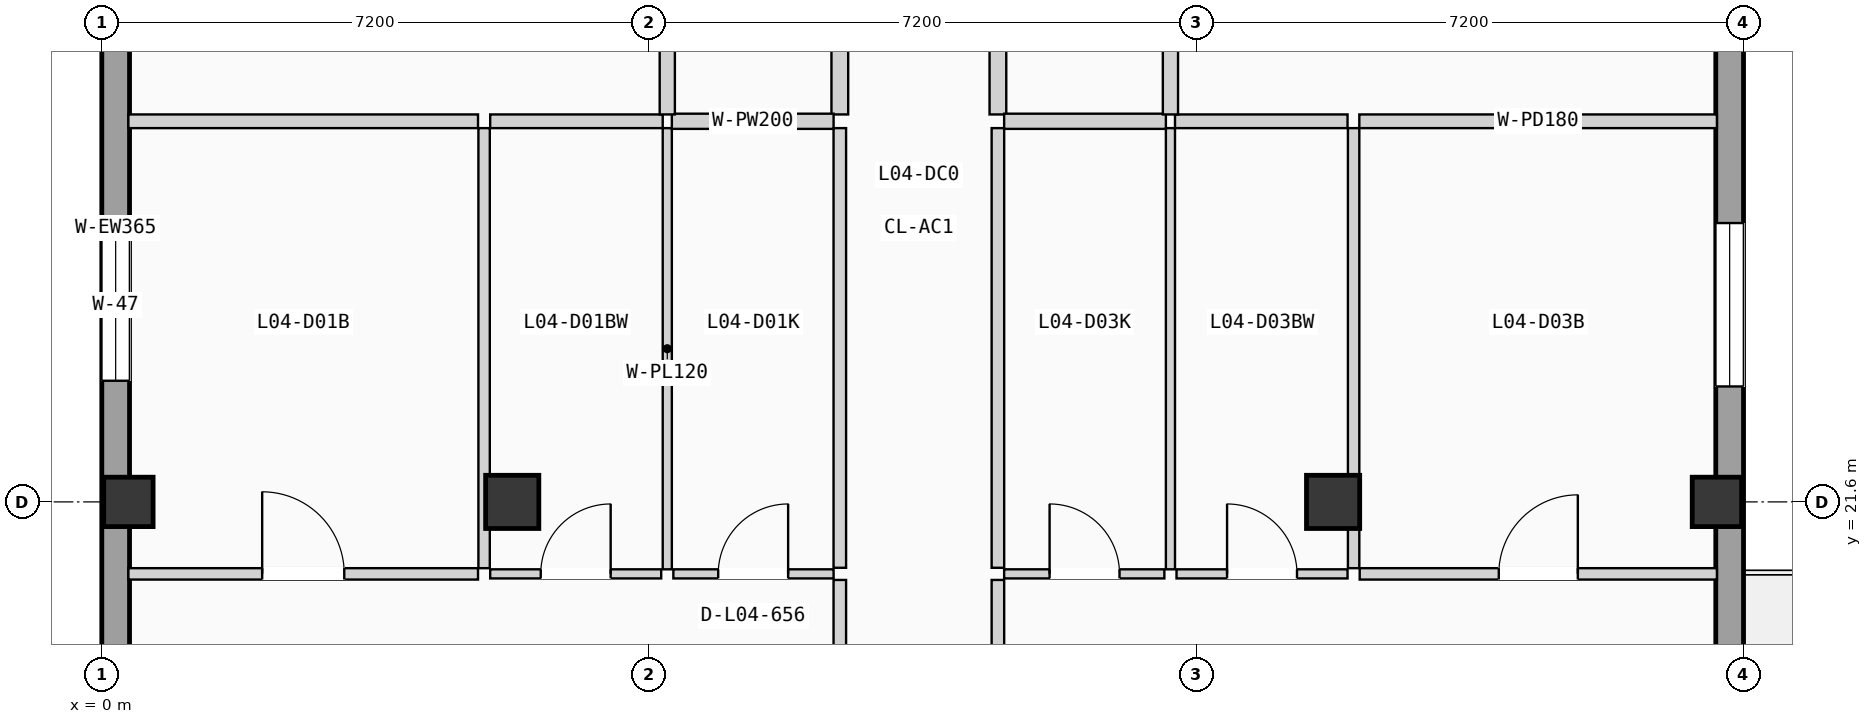
"""IFC4 building model, lengths in metres.
Left out: names, types, materials, properties, quantities, classifications, styles, units other than length and angle.
Written with IfcOpenShell. Run it as: python <this file> out.ifc"""

import sys

from ifc_helpers import new_model, si_unit, direction, frame, frame_2d, origin, origin_2d, place, context, subcontext, project, spatial, rectangle, extrude, element, fill, save


model = new_model("IFC4")
c1 = context("Model", 3, precision=1e-05, world=origin(), true_north=direction((0.0, 1.0)))
c2 = subcontext(c1, "Body", "Model", "MODEL_VIEW")
j1 = project(units=[si_unit("LENGTHUNIT", "METRE"), si_unit("PLANEANGLEUNIT", "RADIAN")], contexts=[c1])
p1 = place(None, origin())
s1 = spatial("IfcSite", under=j1, at=p1, CompositionType="ELEMENT")
p2 = place(p1, origin())
s2 = spatial("IfcBuilding", under=s1, at=p2, CompositionType="ELEMENT")
p3 = place(p2, frame((0.0, 0.0, 15.225)))
s3 = spatial("IfcBuildingStorey", under=s2, at=p3, CompositionType="ELEMENT", Elevation=15.225)
p4 = place(p3, frame((0.35, 21.6, 0.0), z_axis=(0.0, 0.0, 1.0), x_axis=(1.0, 0.0, 0.0)))
e1 = element("IfcColumn", 1, at=p4, inside=s3, PredefinedType="COLUMN", context=c2, shape_type="SweptSolid", body=[
    extrude(rectangle(XDim=0.65, YDim=0.65, at=origin_2d()), origin(), (0.0, 0.0, 1.0), 3.15),
])
for number, where, z_axis, x_axis in (
    (2, (5.4, 21.6, 0.0), (0.0, 0.0, 1.0), (1.0, 0.0, 0.0)),
    (3, (16.2, 21.6, 0.0), (0.0, 0.0, 1.0), (1.0, 0.0, 0.0)),
):
    element("IfcColumn", number, at=place(p3, frame(where, z_axis=z_axis, x_axis=x_axis)), inside=s3, PredefinedType="COLUMN", context=c2, shape_type="SweptSolid", body=[
        extrude(rectangle(XDim=0.7, YDim=0.7, at=origin_2d()), origin(), (0.0, 0.0, 1.0), 3.15),
    ])
p5 = place(p3, frame((21.25, 21.6, 0.0), z_axis=(0.0, 0.0, 1.0), x_axis=(1.0, 0.0, 0.0)))
e4 = element("IfcColumn", 4, at=p5, inside=s3, PredefinedType="COLUMN", context=c2, shape_type="SweptSolid", body=[
    extrude(rectangle(XDim=0.65, YDim=0.65, at=origin_2d()), origin(), (0.0, 0.0, 1.0), 3.15),
])
p6 = place(p3, frame((0.183, 0.365, 0.0), z_axis=(0.0, 0.0, 1.0), x_axis=(0.0, 1.0, 0.0)))
e5 = element("IfcWall", 5, at=p6, inside=s3, PredefinedType="SOLIDWALL", context=c2, shape_type="SweptSolid", body=[
    extrude(rectangle(XDim=49.67, YDim=0.365, at=frame_2d((24.835, 0.0))), origin(), (0.0, 0.0, 1.0), 2.89),
])
p7 = place(p6, frame((16.782, 0.0, 0.85)))
e6 = element("IfcOpeningElement", 6, at=p7, cuts=e5, PredefinedType="OPENING", context=c2, shape_type="SweptSolid", body=[
    extrude(rectangle(XDim=0.95, YDim=1.2, at=frame_2d((0.475, 0.6))), frame((0.0, 0.192, 0.0), z_axis=(0.0, -1.0, 0.0), x_axis=(1.0, 0.0, 0.0)), (0.0, 0.0, 1.0), 0.385),
])
p8 = place(p6, frame((9.127, 0.0, 0.9)))
e7 = element("IfcOpeningElement", 7, at=p8, cuts=e5, PredefinedType="OPENING", context=c2, shape_type="SweptSolid", body=[
    extrude(rectangle(XDim=2.0, YDim=1.2, at=frame_2d((1.0, 0.6))), frame((0.0, 0.192, 0.0), z_axis=(0.0, -1.0, 0.0), x_axis=(1.0, 0.0, 0.0)), (0.0, 0.0, 1.0), 0.385),
])
p9 = place(p6, frame((22.829, 0.0, 0.855)))
e8 = element("IfcOpeningElement", 8, at=p9, cuts=e5, PredefinedType="OPENING", context=c2, shape_type="SweptSolid", body=[
    extrude(rectangle(XDim=2.0, YDim=1.35, at=frame_2d((1.0, 0.675))), frame((0.0, 0.192, 0.0), z_axis=(0.0, -1.0, 0.0), x_axis=(1.0, 0.0, 0.0)), (0.0, 0.0, 1.0), 0.385),
])
p10 = place(p6, frame((32.385, 0.0, 0.705)))
e9 = element("IfcOpeningElement", 9, at=p10, cuts=e5, PredefinedType="OPENING", context=c2, shape_type="SweptSolid", body=[
    extrude(rectangle(XDim=2.0, YDim=1.5, at=frame_2d((1.0, 0.75))), frame((0.0, 0.192, 0.0), z_axis=(0.0, -1.0, 0.0), x_axis=(1.0, 0.0, 0.0)), (0.0, 0.0, 1.0), 0.385),
])
p11 = place(p6, frame((28.975, 0.0, 0.555)))
e10 = element("IfcOpeningElement", 10, at=p11, cuts=e5, PredefinedType="OPENING", context=c2, shape_type="SweptSolid", body=[
    extrude(rectangle(XDim=2.0, YDim=1.65, at=frame_2d((1.0, 0.825))), frame((0.0, 0.192, 0.0), z_axis=(0.0, -1.0, 0.0), x_axis=(1.0, 0.0, 0.0)), (0.0, 0.0, 1.0), 0.385),
])
p12 = place(p6, frame((39.504, 0.0, 0.85)))
e11 = element("IfcOpeningElement", 11, at=p12, cuts=e5, PredefinedType="OPENING", context=c2, shape_type="SweptSolid", body=[
    extrude(rectangle(XDim=0.95, YDim=1.2, at=frame_2d((0.475, 0.6))), frame((0.0, 0.192, 0.0), z_axis=(0.0, -1.0, 0.0), x_axis=(1.0, 0.0, 0.0)), (0.0, 0.0, 1.0), 0.385),
])
p13 = place(p3, frame((21.417, 0.365, 0.0), z_axis=(0.0, 0.0, 1.0), x_axis=(0.0, 1.0, 0.0)))
e12 = element("IfcWall", 12, at=p13, inside=s3, PredefinedType="SOLIDWALL", context=c2, shape_type="SweptSolid", body=[
    extrude(rectangle(XDim=49.67, YDim=0.365, at=frame_2d((24.835, 0.0))), origin(), (0.0, 0.0, 1.0), 2.89),
])
p14 = place(p13, frame((16.335, 0.0, 0.0)))
e13 = element("IfcOpeningElement", 13, at=p14, cuts=e12, PredefinedType="OPENING", context=c2, shape_type="SweptSolid", body=[
    extrude(rectangle(XDim=0.95, YDim=2.15, at=frame_2d((0.475, 1.075))), frame((0.0, 0.192, 0.0), z_axis=(0.0, -1.0, 0.0), x_axis=(1.0, 0.0, 0.0)), (0.0, 0.0, 1.0), 0.385),
])
p15 = place(p13, frame((9.053, 0.0, 0.9)))
e14 = element("IfcOpeningElement", 14, at=p15, cuts=e12, PredefinedType="OPENING", context=c2, shape_type="SweptSolid", body=[
    extrude(rectangle(XDim=2.15, YDim=1.2, at=frame_2d((1.075, 0.6))), frame((0.0, 0.192, 0.0), z_axis=(0.0, -1.0, 0.0), x_axis=(1.0, 0.0, 0.0)), (0.0, 0.0, 1.0), 0.385),
])
p16 = place(p13, frame((22.754, 0.0, 0.855)))
e15 = element("IfcOpeningElement", 15, at=p16, cuts=e12, PredefinedType="OPENING", context=c2, shape_type="SweptSolid", body=[
    extrude(rectangle(XDim=2.15, YDim=1.35, at=frame_2d((1.075, 0.675))), frame((0.0, 0.192, 0.0), z_axis=(0.0, -1.0, 0.0), x_axis=(1.0, 0.0, 0.0)), (0.0, 0.0, 1.0), 0.385),
])
p17 = place(p13, frame((32.43, 0.0, 0.0)))
e16 = element("IfcOpeningElement", 16, at=p17, cuts=e12, PredefinedType="OPENING", context=c2, shape_type="SweptSolid", body=[
    extrude(rectangle(XDim=1.08, YDim=2.18, at=frame_2d((0.54, 1.09))), frame((0.0, 0.192, 0.0), z_axis=(0.0, -1.0, 0.0), x_axis=(1.0, 0.0, 0.0)), (0.0, 0.0, 1.0), 0.385),
])
p18 = place(p13, frame((29.5, 0.0, 0.85)))
e17 = element("IfcOpeningElement", 17, at=p18, cuts=e12, PredefinedType="OPENING", context=c2, shape_type="SweptSolid", body=[
    extrude(rectangle(XDim=0.95, YDim=1.2, at=frame_2d((0.475, 0.6))), frame((0.0, 0.192, 0.0), z_axis=(0.0, -1.0, 0.0), x_axis=(1.0, 0.0, 0.0)), (0.0, 0.0, 1.0), 0.385),
])
p19 = place(p13, frame((38.904, 0.0, 0.555)))
e18 = element("IfcOpeningElement", 18, at=p19, cuts=e12, PredefinedType="OPENING", context=c2, shape_type="SweptSolid", body=[
    extrude(rectangle(XDim=2.15, YDim=1.65, at=frame_2d((1.075, 0.825))), frame((0.0, 0.192, 0.0), z_axis=(0.0, -1.0, 0.0), x_axis=(1.0, 0.0, 0.0)), (0.0, 0.0, 1.0), 0.385),
])
p20 = place(p3, frame((9.71, 13.545, 0.0), z_axis=(0.0, 0.0, 1.0), x_axis=(0.0, 1.0, 0.0)))
e19 = element("IfcWall", 19, at=p20, inside=s3, PredefinedType="PARTITIONING", context=c2, shape_type="SweptSolid", body=[
    extrude(rectangle(XDim=7.028, YDim=0.165, at=frame_2d((3.514, 0.0))), origin(), (0.0, 0.0, 1.0), 2.87),
])
p21 = place(p20, frame((3.009, 0.0, 0.0)))
e20 = element("IfcOpeningElement", 20, at=p21, cuts=e19, PredefinedType="OPENING", context=c2, shape_type="SweptSolid", body=[
    extrude(rectangle(XDim=1.01, YDim=2.11, at=frame_2d((0.505, 1.055))), frame((0.0, 0.093, 0.0), z_axis=(0.0, -1.0, 0.0), x_axis=(1.0, 0.0, 0.0)), (0.0, 0.0, 1.0), 0.185),
])
p22 = place(p3, frame((9.71, 20.733, 0.0), z_axis=(0.0, 0.0, 1.0), x_axis=(0.0, 1.0, 0.0)))
e21 = element("IfcWall", 21, at=p22, inside=s3, PredefinedType="PARTITIONING", context=c2, shape_type="SweptSolid", body=[
    extrude(rectangle(XDim=5.785, YDim=0.165, at=frame_2d((2.893, 0.0))), origin(), (0.0, 0.0, 1.0), 2.87),
])
p23 = place(p3, frame((9.71, 26.698, 0.0), z_axis=(0.0, 0.0, 1.0), x_axis=(0.0, 1.0, 0.0)))
e22 = element("IfcWall", 22, at=p23, inside=s3, PredefinedType="PLUMBINGWALL", context=c2, shape_type="SweptSolid", body=[
    extrude(rectangle(XDim=4.912, YDim=0.22, at=frame_2d((2.456, 0.0))), origin(), (0.0, 0.0, 1.0), 2.87),
])
p24 = place(p3, frame((11.79, 13.545, 0.0), z_axis=(0.0, 0.0, 1.0), x_axis=(0.0, 1.0, 0.0)))
e23 = element("IfcWall", 23, at=p24, inside=s3, PredefinedType="PARTITIONING", context=c2, shape_type="SweptSolid", body=[
    extrude(rectangle(XDim=7.028, YDim=0.165, at=frame_2d((3.514, 0.0))), origin(), (0.0, 0.0, 1.0), 2.87),
])
p25 = place(p24, frame((3.009, 0.0, 0.0)))
e24 = element("IfcOpeningElement", 24, at=p25, cuts=e23, PredefinedType="OPENING", context=c2, shape_type="SweptSolid", body=[
    extrude(rectangle(XDim=1.01, YDim=2.11, at=frame_2d((0.505, 1.055))), frame((0.0, 0.093, 0.0), z_axis=(0.0, -1.0, 0.0), x_axis=(1.0, 0.0, 0.0)), (0.0, 0.0, 1.0), 0.185),
])
p26 = place(p3, frame((11.79, 20.733, 0.0), z_axis=(0.0, 0.0, 1.0), x_axis=(0.0, 1.0, 0.0)))
e25 = element("IfcWall", 25, at=p26, inside=s3, PredefinedType="PARTITIONING", context=c2, shape_type="SweptSolid", body=[
    extrude(rectangle(XDim=5.785, YDim=0.165, at=frame_2d((2.893, 0.0))), origin(), (0.0, 0.0, 1.0), 2.87),
])
p27 = place(p3, frame((11.79, 26.698, 0.0), z_axis=(0.0, 0.0, 1.0), x_axis=(0.0, 1.0, 0.0)))
e26 = element("IfcWall", 26, at=p27, inside=s3, PredefinedType="PLUMBINGWALL", context=c2, shape_type="SweptSolid", body=[
    extrude(rectangle(XDim=4.912, YDim=0.22, at=frame_2d((2.456, 0.0))), origin(), (0.0, 0.0, 1.0), 2.87),
])
p28 = place(p3, frame((7.52, 20.653, 0.0), z_axis=(0.0, 0.0, 1.0), x_axis=(1.0, 0.0, 0.0)))
e27 = element("IfcWall", 27, at=p28, inside=s3, PredefinedType="PARTITIONING", context=c2, shape_type="SweptSolid", body=[
    extrude(rectangle(XDim=2.108, YDim=0.12, at=frame_2d((1.054, 0.0))), origin(), (0.0, 0.0, 1.0), 2.87),
])
p29 = place(p28, frame((0.59, 0.0, 0.0)))
e28 = element("IfcOpeningElement", 28, at=p29, cuts=e27, PredefinedType="OPENING", context=c2, shape_type="SweptSolid", body=[
    extrude(rectangle(XDim=0.92, YDim=2.02, at=frame_2d((0.46, 1.01))), frame((0.0, 0.07, 0.0), z_axis=(0.0, -1.0, 0.0), x_axis=(1.0, 0.0, 0.0)), (0.0, 0.0, 1.0), 0.14),
])
p30 = place(p3, frame((0.35, 20.653, 0.0), z_axis=(0.0, 0.0, 1.0), x_axis=(1.0, 0.0, 0.0)))
e29 = element("IfcWall", 29, at=p30, inside=s3, PredefinedType="PARTITIONING", context=c2, shape_type="SweptSolid", body=[
    extrude(rectangle(XDim=4.6, YDim=0.15, at=frame_2d((2.3, 0.0))), origin(), (0.0, 0.0, 1.0), 2.87),
])
p31 = place(p30, frame((1.76, 0.0, 0.0)))
e30 = element("IfcOpeningElement", 30, at=p31, cuts=e29, PredefinedType="OPENING", context=c2, shape_type="SweptSolid", body=[
    extrude(rectangle(XDim=1.08, YDim=2.1, at=frame_2d((0.54, 1.05))), frame((0.0, 0.085, 0.0), z_axis=(0.0, -1.0, 0.0), x_axis=(1.0, 0.0, 0.0)), (0.0, 0.0, 1.0), 0.17),
])
p32 = place(p3, frame((5.11, 20.653, 0.0), z_axis=(0.0, 0.0, 1.0), x_axis=(1.0, 0.0, 0.0)))
e31 = element("IfcWall", 31, at=p32, inside=s3, PredefinedType="PARTITIONING", context=c2, shape_type="SweptSolid", body=[
    extrude(rectangle(XDim=2.25, YDim=0.12, at=frame_2d((1.125, 0.0))), origin(), (0.0, 0.0, 1.0), 2.87),
])
p33 = place(p32, frame((0.665, 0.0, 0.0)))
e32 = element("IfcOpeningElement", 32, at=p33, cuts=e31, PredefinedType="OPENING", context=c2, shape_type="SweptSolid", body=[
    extrude(rectangle(XDim=0.92, YDim=2.02, at=frame_2d((0.46, 1.01))), frame((0.0, 0.07, 0.0), z_axis=(0.0, -1.0, 0.0), x_axis=(1.0, 0.0, 0.0)), (0.0, 0.0, 1.0), 0.14),
])
p34 = place(p3, frame((7.44, 20.713, 0.0), z_axis=(0.0, 0.0, 1.0), x_axis=(0.0, 1.0, 0.0)))
e33 = element("IfcWall", 33, at=p34, inside=s3, PredefinedType="PARTITIONING", context=c2, shape_type="SweptSolid", body=[
    extrude(rectangle(XDim=5.805, YDim=0.12, at=frame_2d((2.903, 0.0))), origin(), (0.0, 0.0, 1.0), 2.87),
])
p35 = place(p3, frame((7.5, 26.608, 0.0), z_axis=(0.0, 0.0, 1.0), x_axis=(1.0, 0.0, 0.0)))
e34 = element("IfcWall", 34, at=p35, inside=s3, PredefinedType="PLUMBINGWALL", context=c2, shape_type="SweptSolid", body=[
    extrude(rectangle(XDim=2.128, YDim=0.2, at=frame_2d((1.064, 0.0))), origin(), (0.0, 0.0, 1.0), 2.87),
])
p36 = place(p3, frame((5.03, 20.728, 0.0), z_axis=(0.0, 0.0, 1.0), x_axis=(0.0, 1.0, 0.0)))
e35 = element("IfcWall", 35, at=p36, inside=s3, PredefinedType="PARTITIONING", context=c2, shape_type="SweptSolid", body=[
    extrude(rectangle(XDim=5.79, YDim=0.15, at=frame_2d((2.895, 0.0))), origin(), (0.0, 0.0, 1.0), 2.87),
])
p37 = place(p3, frame((0.35, 26.608, 0.0), z_axis=(0.0, 0.0, 1.0), x_axis=(1.0, 0.0, 0.0)))
e36 = element("IfcWall", 36, at=p37, inside=s3, PredefinedType="PARTITIONING", context=c2, shape_type="SweptSolid", body=[
    extrude(rectangle(XDim=4.6, YDim=0.18, at=frame_2d((2.3, 0.0))), origin(), (0.0, 0.0, 1.0), 2.87),
])
p38 = place(p3, frame((5.11, 26.608, 0.0), z_axis=(0.0, 0.0, 1.0), x_axis=(1.0, 0.0, 0.0)))
e37 = element("IfcWall", 37, at=p38, inside=s3, PredefinedType="PARTITIONING", context=c2, shape_type="SweptSolid", body=[
    extrude(rectangle(XDim=2.27, YDim=0.18, at=frame_2d((1.135, 0.0))), origin(), (0.0, 0.0, 1.0), 2.87),
])
p39 = place(p3, frame((7.44, 26.698, 0.0), z_axis=(0.0, 0.0, 1.0), x_axis=(0.0, 1.0, 0.0)))
e38 = element("IfcWall", 38, at=p39, inside=s3, PredefinedType="PLUMBINGWALL", context=c2, shape_type="SweptSolid", body=[
    extrude(rectangle(XDim=4.917, YDim=0.2, at=frame_2d((2.458, 0.0))), origin(), (0.0, 0.0, 1.0), 2.87),
])
p40 = place(p3, frame((11.872, 20.653, 0.0), z_axis=(0.0, 0.0, 1.0), x_axis=(1.0, 0.0, 0.0)))
e39 = element("IfcWall", 39, at=p40, inside=s3, PredefinedType="PARTITIONING", context=c2, shape_type="SweptSolid", body=[
    extrude(rectangle(XDim=2.108, YDim=0.12, at=frame_2d((1.054, 0.0))), origin(), (0.0, 0.0, 1.0), 2.87),
])
p41 = place(p40, frame((0.598, 0.0, 0.0)))
e40 = element("IfcOpeningElement", 40, at=p41, cuts=e39, PredefinedType="OPENING", context=c2, shape_type="SweptSolid", body=[
    extrude(rectangle(XDim=0.92, YDim=2.02, at=frame_2d((0.46, 1.01))), frame((0.0, 0.07, 0.0), z_axis=(0.0, -1.0, 0.0), x_axis=(1.0, 0.0, 0.0)), (0.0, 0.0, 1.0), 0.14),
])
p42 = place(p3, frame((16.55, 20.653, 0.0), z_axis=(0.0, 0.0, 1.0), x_axis=(1.0, 0.0, 0.0)))
e41 = element("IfcWall", 41, at=p42, inside=s3, PredefinedType="PARTITIONING", context=c2, shape_type="SweptSolid", body=[
    extrude(rectangle(XDim=4.7, YDim=0.15, at=frame_2d((2.35, 0.0))), origin(), (0.0, 0.0, 1.0), 2.87),
])
p43 = place(p42, frame((1.83, 0.0, 0.0)))
e42 = element("IfcOpeningElement", 42, at=p43, cuts=e41, PredefinedType="OPENING", context=c2, shape_type="SweptSolid", body=[
    extrude(rectangle(XDim=1.04, YDim=2.08, at=frame_2d((0.52, 1.04))), frame((0.0, 0.085, 0.0), z_axis=(0.0, -1.0, 0.0), x_axis=(1.0, 0.0, 0.0)), (0.0, 0.0, 1.0), 0.17),
])
p44 = place(p3, frame((14.14, 20.653, 0.0), z_axis=(0.0, 0.0, 1.0), x_axis=(1.0, 0.0, 0.0)))
e43 = element("IfcWall", 43, at=p44, inside=s3, PredefinedType="PARTITIONING", context=c2, shape_type="SweptSolid", body=[
    extrude(rectangle(XDim=2.25, YDim=0.12, at=frame_2d((1.125, 0.0))), origin(), (0.0, 0.0, 1.0), 2.87),
])
p45 = place(p44, frame((0.665, 0.0, 0.0)))
e44 = element("IfcOpeningElement", 44, at=p45, cuts=e43, PredefinedType="OPENING", context=c2, shape_type="SweptSolid", body=[
    extrude(rectangle(XDim=0.92, YDim=2.02, at=frame_2d((0.46, 1.01))), frame((0.0, 0.07, 0.0), z_axis=(0.0, -1.0, 0.0), x_axis=(1.0, 0.0, 0.0)), (0.0, 0.0, 1.0), 0.14),
])
p46 = place(p3, frame((14.06, 20.713, 0.0), z_axis=(0.0, 0.0, 1.0), x_axis=(0.0, 1.0, 0.0)))
e45 = element("IfcWall", 45, at=p46, inside=s3, PredefinedType="PARTITIONING", context=c2, shape_type="SweptSolid", body=[
    extrude(rectangle(XDim=5.805, YDim=0.12, at=frame_2d((2.903, 0.0))), origin(), (0.0, 0.0, 1.0), 2.87),
])
p47 = place(p3, frame((11.872, 26.608, 0.0), z_axis=(0.0, 0.0, 1.0), x_axis=(1.0, 0.0, 0.0)))
e46 = element("IfcWall", 46, at=p47, inside=s3, PredefinedType="PLUMBINGWALL", context=c2, shape_type="SweptSolid", body=[
    extrude(rectangle(XDim=2.128, YDim=0.2, at=frame_2d((1.064, 0.0))), origin(), (0.0, 0.0, 1.0), 2.87),
])
p48 = place(p3, frame((16.47, 20.728, 0.0), z_axis=(0.0, 0.0, 1.0), x_axis=(0.0, 1.0, 0.0)))
e47 = element("IfcWall", 47, at=p48, inside=s3, PredefinedType="PARTITIONING", context=c2, shape_type="SweptSolid", body=[
    extrude(rectangle(XDim=5.79, YDim=0.15, at=frame_2d((2.895, 0.0))), origin(), (0.0, 0.0, 1.0), 2.87),
])
p49 = place(p3, frame((16.545, 26.608, 0.0), z_axis=(0.0, 0.0, 1.0), x_axis=(1.0, 0.0, 0.0)))
e48 = element("IfcWall", 48, at=p49, inside=s3, PredefinedType="PARTITIONING", context=c2, shape_type="SweptSolid", body=[
    extrude(rectangle(XDim=4.705, YDim=0.18, at=frame_2d((2.353, 0.0))), origin(), (0.0, 0.0, 1.0), 2.87),
])
p50 = place(p3, frame((14.12, 26.608, 0.0), z_axis=(0.0, 0.0, 1.0), x_axis=(1.0, 0.0, 0.0)))
e49 = element("IfcWall", 49, at=p50, inside=s3, PredefinedType="PARTITIONING", context=c2, shape_type="SweptSolid", body=[
    extrude(rectangle(XDim=2.27, YDim=0.18, at=frame_2d((1.135, 0.0))), origin(), (0.0, 0.0, 1.0), 2.87),
])
p51 = place(p3, frame((14.06, 26.698, 0.0), z_axis=(0.0, 0.0, 1.0), x_axis=(0.0, 1.0, 0.0)))
e50 = element("IfcWall", 50, at=p51, inside=s3, PredefinedType="PLUMBINGWALL", context=c2, shape_type="SweptSolid", body=[
    extrude(rectangle(XDim=4.917, YDim=0.2, at=frame_2d((2.458, 0.0))), origin(), (0.0, 0.0, 1.0), 2.87),
])
p52 = place(p9, origin())
e51 = element("IfcWindow", 51, at=p52, inside=s3, PartitioningType="DOUBLE_PANEL_VERTICAL", PredefinedType="WINDOW", context=c2, shape_type="SweptSolid", body=[
    extrude(rectangle(XDim=2.0, YDim=1.35, at=frame_2d((1.0, 0.675))), frame((0.0, 0.03, 0.0), z_axis=(0.0, -1.0, 0.0), x_axis=(1.0, 0.0, 0.0)), (0.0, 0.0, 1.0), 0.06),
])
fill(e8, e51)
p53 = place(p16, origin())
e52 = element("IfcWindow", 52, at=p53, inside=s3, PartitioningType="DOUBLE_PANEL_VERTICAL", PredefinedType="WINDOW", context=c2, shape_type="SweptSolid", body=[
    extrude(rectangle(XDim=2.15, YDim=1.35, at=frame_2d((1.075, 0.675))), frame((0.0, 0.03, 0.0), z_axis=(0.0, -1.0, 0.0), x_axis=(1.0, 0.0, 0.0)), (0.0, 0.0, 1.0), 0.06),
])
fill(e15, e52)
p54 = place(p29, origin())
e53 = element("IfcDoor", 53, at=p54, inside=s3, OperationType="SINGLE_SWING_RIGHT", PredefinedType="DOOR", context=c2, shape_type="SweptSolid", body=[
    extrude(rectangle(XDim=0.92, YDim=2.02, at=frame_2d((0.46, 1.01))), frame((0.0, 0.025, 0.0), z_axis=(0.0, -1.0, 0.0), x_axis=(1.0, 0.0, 0.0)), (0.0, 0.0, 1.0), 0.05),
])
fill(e28, e53)
p55 = place(p31, origin())
e54 = element("IfcDoor", 54, at=p55, inside=s3, OperationType="SINGLE_SWING_LEFT", PredefinedType="DOOR", context=c2, shape_type="SweptSolid", body=[
    extrude(rectangle(XDim=1.08, YDim=2.1, at=frame_2d((0.54, 1.05))), frame((0.0, 0.025, 0.0), z_axis=(0.0, -1.0, 0.0), x_axis=(1.0, 0.0, 0.0)), (0.0, 0.0, 1.0), 0.05),
])
fill(e30, e54)
p56 = place(p33, origin())
e55 = element("IfcDoor", 55, at=p56, inside=s3, OperationType="SINGLE_SWING_RIGHT", PredefinedType="DOOR", context=c2, shape_type="SweptSolid", body=[
    extrude(rectangle(XDim=0.92, YDim=2.02, at=frame_2d((0.46, 1.01))), frame((0.0, 0.025, 0.0), z_axis=(0.0, -1.0, 0.0), x_axis=(1.0, 0.0, 0.0)), (0.0, 0.0, 1.0), 0.05),
])
fill(e32, e55)
p57 = place(p41, origin())
e56 = element("IfcDoor", 56, at=p57, inside=s3, OperationType="SINGLE_SWING_LEFT", PredefinedType="DOOR", context=c2, shape_type="SweptSolid", body=[
    extrude(rectangle(XDim=0.92, YDim=2.02, at=frame_2d((0.46, 1.01))), frame((0.0, 0.025, 0.0), z_axis=(0.0, -1.0, 0.0), x_axis=(1.0, 0.0, 0.0)), (0.0, 0.0, 1.0), 0.05),
])
fill(e40, e56)
p58 = place(p43, origin())
e57 = element("IfcDoor", 57, at=p58, inside=s3, OperationType="SINGLE_SWING_RIGHT", PredefinedType="DOOR", context=c2, shape_type="SweptSolid", body=[
    extrude(rectangle(XDim=1.04, YDim=2.08, at=frame_2d((0.52, 1.04))), frame((0.0, 0.025, 0.0), z_axis=(0.0, -1.0, 0.0), x_axis=(1.0, 0.0, 0.0)), (0.0, 0.0, 1.0), 0.05),
])
fill(e42, e57)
p59 = place(p45, origin())
e58 = element("IfcDoor", 58, at=p59, inside=s3, OperationType="SINGLE_SWING_LEFT", PredefinedType="DOOR", context=c2, shape_type="SweptSolid", body=[
    extrude(rectangle(XDim=0.92, YDim=2.02, at=frame_2d((0.46, 1.01))), frame((0.0, 0.025, 0.0), z_axis=(0.0, -1.0, 0.0), x_axis=(1.0, 0.0, 0.0)), (0.0, 0.0, 1.0), 0.05),
])
fill(e44, e58)
save(model, sys.argv[1])
